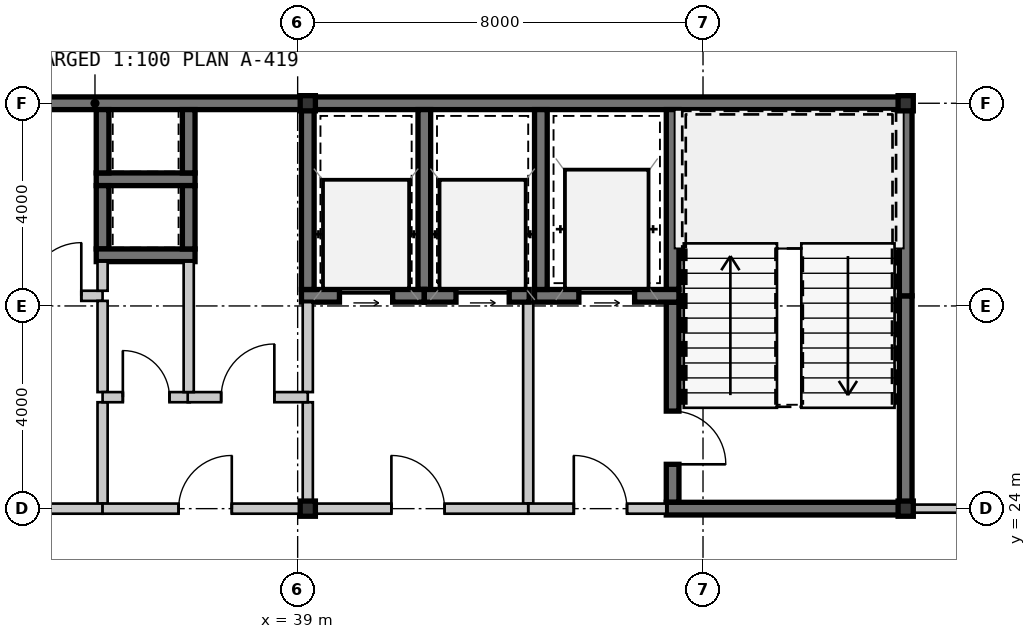
"""IFC4 building model, lengths in metres.
Left out: names, types, materials, properties, quantities, classifications, styles, units other than length and angle.
Written with IfcOpenShell. Run it as: python <this file> out.ifc"""

import sys

from ifc_helpers import new_model, si_unit, direction, frame, frame_2d, origin, origin_2d, place, context, subcontext, project, spatial, rectangle, hollow_rectangle, extrude, source, transform, mapped, element, fill, save


model = new_model("IFC4")
c1 = context("Model", 3, precision=1e-05, world=origin(), true_north=direction((0.0, 1.0)))
c2 = subcontext(c1, "Body", "Model", "MODEL_VIEW")
j1 = project(units=[si_unit("LENGTHUNIT", "METRE"), si_unit("PLANEANGLEUNIT", "RADIAN")], contexts=[c1])
p1 = place(None, origin())
s1 = spatial("IfcSite", under=j1, at=p1, CompositionType="ELEMENT")
p2 = place(p1, origin())
s2 = spatial("IfcBuilding", under=s1, at=p2, CompositionType="ELEMENT")
p3 = place(p2, frame((0.0, 0.0, 214.55)))
s3 = spatial("IfcBuildingStorey", under=s2, at=p3, CompositionType="ELEMENT", Elevation=214.55)
m1 = source(origin(), c2, "Body", "SweptSolid", [
    extrude(hollow_rectangle(XDim=0.3, YDim=0.3, WallThickness=0.012, at=origin_2d()), origin(), (0.0, 0.0, 1.0), 3.15),
])
for number, where, z_axis, x_axis in (
    (1, (39.2, 24.0, 0.0), (0.0, 0.0, 1.0), (1.0, 0.0, 0.0)),
    (2, (51.0, 24.0, 0.0), (0.0, 0.0, 1.0), (1.0, 0.0, 0.0)),
    (3, (39.2, 32.0, 0.0), (0.0, 0.0, 1.0), (1.0, 0.0, 0.0)),
    (4, (51.0, 32.0, 0.0), (0.0, 0.0, 1.0), (1.0, 0.0, 0.0)),
):
    element("IfcColumn", number, at=place(p3, frame(where, z_axis=z_axis, x_axis=x_axis)), inside=s3, PredefinedType="COLUMN", context=c2, shape_type="MappedRepresentation", body=[
        mapped(m1, transform((0.0, 0.0, 0.0), scale=1.0)),
    ])
m2 = source(origin(), c2, "Body", "SweptSolid", [
    extrude(rectangle(XDim=11.2, YDim=0.25, at=frame_2d((5.6, 0.0))), origin(), (0.0, 0.0, 1.0), 2.93),
])
p4 = place(p3, frame((28.0, 32.0, 0.0), z_axis=(0.0, 0.0, 1.0), x_axis=(1.0, 0.0, 0.0)))
e5 = element("IfcWall", 5, at=p4, inside=s3, PredefinedType="SHEAR", context=c2, shape_type="MappedRepresentation", body=[
    mapped(m2, transform((0.0, 0.0, 0.0), scale=1.0)),
])
m3 = source(origin(), c2, "Body", "SweptSolid", [
    extrude(rectangle(XDim=11.925, YDim=0.25, at=frame_2d((5.962, 0.0))), origin(), (0.0, 0.0, 1.0), 2.93),
])
p5 = place(p3, frame((39.2, 32.0, 0.0), z_axis=(0.0, 0.0, 1.0), x_axis=(1.0, 0.0, 0.0)))
e6 = element("IfcWall", 6, at=p5, inside=s3, PredefinedType="SHEAR", context=c2, shape_type="MappedRepresentation", body=[
    mapped(m3, transform((0.0, 0.0, 0.0), scale=1.0)),
])
m4 = source(origin(), c2, "Body", "SweptSolid", [
    extrude(rectangle(XDim=4.075, YDim=0.25, at=frame_2d((2.038, 0.0))), origin(), (0.0, 0.0, 1.0), 2.93),
])
p6 = place(p3, frame((51.0, 24.125, 0.0), z_axis=(0.0, 0.0, 1.0), x_axis=(0.0, 1.0, 0.0)))
e7 = element("IfcWall", 7, at=p6, inside=s3, PredefinedType="SHEAR", context=c2, shape_type="MappedRepresentation", body=[
    mapped(m4, transform((0.0, 0.0, 0.0), scale=1.0)),
])
m5 = source(origin(), c2, "Body", "SweptSolid", [
    extrude(rectangle(XDim=3.675, YDim=0.25, at=frame_2d((1.837, 0.0))), origin(), (0.0, 0.0, 1.0), 2.93),
])
p7 = place(p3, frame((51.0, 28.2, 0.0), z_axis=(0.0, 0.0, 1.0), x_axis=(0.0, 1.0, 0.0)))
e8 = element("IfcWall", 8, at=p7, inside=s3, PredefinedType="SHEAR", context=c2, shape_type="MappedRepresentation", body=[
    mapped(m5, transform((0.0, 0.0, 0.0), scale=1.0)),
])
m6 = source(origin(), c2, "Body", "SweptSolid", [
    extrude(rectangle(XDim=3.55, YDim=0.25, at=frame_2d((1.775, 0.0))), origin(), (0.0, 0.0, 1.0), 2.93),
])
p8 = place(p3, frame((46.4, 31.875, 0.0), z_axis=(0.0, 0.0, 1.0), x_axis=(0.0, -1.0, 0.0)))
e9 = element("IfcWall", 9, at=p8, inside=s3, PredefinedType="SHEAR", context=c2, shape_type="MappedRepresentation", body=[
    mapped(m6, transform((0.0, 0.0, 0.0), scale=1.0)),
])
m7 = source(origin(), c2, "Body", "SweptSolid", [
    extrude(rectangle(XDim=3.95, YDim=0.25, at=frame_2d((1.975, 0.0))), origin(), (0.0, 0.0, 1.0), 2.93),
])
p9 = place(p3, frame((46.4, 28.075, 0.0), z_axis=(0.0, 0.0, 1.0), x_axis=(0.0, -1.0, 0.0)))
e10 = element("IfcWall", 10, at=p9, inside=s3, PredefinedType="SHEAR", context=c2, shape_type="MappedRepresentation", body=[
    mapped(m7, transform((0.0, 0.0, 0.0), scale=1.0)),
])
m8 = source(origin(), c2, "Body", "SweptSolid", [
    extrude(rectangle(XDim=1.05, YDim=2.1, at=frame_2d((0.525, 1.05))), frame((0.0, 0.135, 0.0), z_axis=(0.0, -1.0, 0.0), x_axis=(1.0, 0.0, 0.0)), (0.0, 0.0, 1.0), 0.27),
])
p10 = place(p9, frame((2.15, 0.0, 0.0)))
e11 = element("IfcOpeningElement", 11, at=p10, cuts=e10, PredefinedType="OPENING", context=c2, shape_type="MappedRepresentation", body=[
    mapped(m8, transform((0.0, 0.0, 0.0), scale=1.0)),
])
m9 = source(origin(), c2, "Body", "SweptSolid", [
    extrude(rectangle(XDim=4.85, YDim=0.25, at=frame_2d((2.425, 0.0))), origin(), (0.0, 0.0, 1.0), 2.93),
])
p11 = place(p3, frame((46.275, 24.0, 0.0), z_axis=(0.0, 0.0, 1.0), x_axis=(1.0, 0.0, 0.0)))
e12 = element("IfcWall", 12, at=p11, inside=s3, PredefinedType="SHEAR", context=c2, shape_type="MappedRepresentation", body=[
    mapped(m9, transform((0.0, 0.0, 0.0), scale=1.0)),
])
m10 = source(origin(), c2, "Body", "SweptSolid", [
    extrude(rectangle(XDim=2.85, YDim=0.25, at=frame_2d((1.425, 0.0))), origin(), (0.0, 0.0, 1.0), 2.93),
])
p12 = place(p3, frame((43.675, 28.2, 0.0), z_axis=(0.0, 0.0, 1.0), x_axis=(1.0, 0.0, 0.0)))
e13 = element("IfcWall", 13, at=p12, inside=s3, PredefinedType="SHEAR", context=c2, shape_type="MappedRepresentation", body=[
    mapped(m10, transform((0.0, 0.0, 0.0), scale=1.0)),
])
m11 = source(origin(), c2, "Body", "SweptSolid", [
    extrude(rectangle(XDim=1.1, YDim=2.15, at=frame_2d((0.55, 1.075))), frame((0.0, 0.135, 0.0), z_axis=(0.0, -1.0, 0.0), x_axis=(1.0, 0.0, 0.0)), (0.0, 0.0, 1.0), 0.27),
])
p13 = place(p12, frame((0.875, 0.0, 0.0)))
e14 = element("IfcOpeningElement", 14, at=p13, cuts=e13, PredefinedType="OPENING", context=c2, shape_type="MappedRepresentation", body=[
    mapped(m11, transform((0.0, 0.0, 0.0), scale=1.0)),
])
p14 = place(p3, frame((43.8, 31.875, 0.0), z_axis=(0.0, 0.0, 1.0), x_axis=(0.0, -1.0, 0.0)))
e15 = element("IfcWall", 15, at=p14, inside=s3, PredefinedType="SHEAR", context=c2, shape_type="MappedRepresentation", body=[
    mapped(m6, transform((0.0, 0.0, 0.0), scale=1.0)),
])
m12 = source(origin(), c2, "Body", "SweptSolid", [
    extrude(rectangle(XDim=3.975, YDim=0.2, at=frame_2d((1.987, 0.0))), origin(), (0.0, 0.0, 1.0), 2.93),
])
p15 = place(p3, frame((43.55, 28.075, 0.0), z_axis=(0.0, 0.0, 1.0), x_axis=(0.0, -1.0, 0.0)))
e16 = element("IfcWall", 16, at=p15, inside=s3, PredefinedType="SOLIDWALL", context=c2, shape_type="MappedRepresentation", body=[
    mapped(m12, transform((0.0, 0.0, 0.0), scale=1.0)),
])
m13 = source(origin(), c2, "Body", "SweptSolid", [
    extrude(rectangle(XDim=2.725, YDim=0.2, at=frame_2d((1.362, 0.0))), origin(), (0.0, 0.0, 1.0), 2.397),
])
p16 = place(p3, frame((43.55, 24.0, 0.0), z_axis=(0.0, 0.0, 1.0), x_axis=(1.0, 0.0, 0.0)))
e17 = element("IfcWall", 17, at=p16, inside=s3, PredefinedType="SOLIDWALL", context=c2, shape_type="MappedRepresentation", body=[
    mapped(m13, transform((0.0, 0.0, 0.0), scale=1.0)),
])
m14 = source(origin(), c2, "Body", "SweptSolid", [
    extrude(rectangle(XDim=1.05, YDim=2.1, at=frame_2d((0.525, 1.05))), frame((0.0, 0.11, 0.0), z_axis=(0.0, -1.0, 0.0), x_axis=(1.0, 0.0, 0.0)), (0.0, 0.0, 1.0), 0.22),
])
p17 = place(p16, frame((0.9, 0.0, 0.0)))
e18 = element("IfcOpeningElement", 18, at=p17, cuts=e17, PredefinedType="OPENING", context=c2, shape_type="MappedRepresentation", body=[
    mapped(m14, transform((0.0, 0.0, 0.0), scale=1.0)),
])
m15 = source(origin(), c2, "Body", "SweptSolid", [
    extrude(rectangle(XDim=1.95, YDim=0.25, at=frame_2d((0.975, 0.0))), origin(), (0.0, 0.0, 1.0), 2.93),
])
p18 = place(p3, frame((35.025, 30.5, 0.0), z_axis=(0.0, 0.0, 1.0), x_axis=(1.0, 0.0, 0.0)))
e19 = element("IfcWall", 19, at=p18, inside=s3, PredefinedType="SHEAR", context=c2, shape_type="MappedRepresentation", body=[
    mapped(m15, transform((0.0, 0.0, 0.0), scale=1.0)),
])
m16 = source(origin(), c2, "Body", "SweptSolid", [
    extrude(rectangle(XDim=1.25, YDim=0.25, at=frame_2d((0.625, 0.0))), origin(), (0.0, 0.0, 1.0), 2.93),
])
for number, where, z_axis, x_axis in (
    (20, (35.15, 31.875, 0.0), (0.0, 0.0, 1.0), (0.0, -1.0, 0.0)),
    (21, (36.85, 30.625, 0.0), (0.0, 0.0, 1.0), (0.0, 1.0, 0.0)),
    (22, (35.15, 30.375, 0.0), (0.0, 0.0, 1.0), (0.0, -1.0, 0.0)),
):
    element("IfcWall", number, at=place(p3, frame(where, z_axis=z_axis, x_axis=x_axis)), inside=s3, PredefinedType="SHEAR", context=c2, shape_type="MappedRepresentation", body=[
        mapped(m16, transform((0.0, 0.0, 0.0), scale=1.0)),
    ])
p19 = place(p3, frame((35.025, 29.0, 0.0), z_axis=(0.0, 0.0, 1.0), x_axis=(1.0, 0.0, 0.0)))
e23 = element("IfcWall", 23, at=p19, inside=s3, PredefinedType="SHEAR", context=c2, shape_type="MappedRepresentation", body=[
    mapped(m15, transform((0.0, 0.0, 0.0), scale=1.0)),
])
p20 = place(p3, frame((36.85, 29.125, 0.0), z_axis=(0.0, 0.0, 1.0), x_axis=(0.0, 1.0, 0.0)))
e24 = element("IfcWall", 24, at=p20, inside=s3, PredefinedType="SHEAR", context=c2, shape_type="MappedRepresentation", body=[
    mapped(m16, transform((0.0, 0.0, 0.0), scale=1.0)),
])
p21 = place(p3, frame((41.5, 28.325, 0.0), z_axis=(0.0, 0.0, 1.0), x_axis=(0.0, 1.0, 0.0)))
e25 = element("IfcWall", 25, at=p21, inside=s3, PredefinedType="SHEAR", context=c2, shape_type="MappedRepresentation", body=[
    mapped(m6, transform((0.0, 0.0, 0.0), scale=1.0)),
])
m17 = source(origin(), c2, "Body", "SweptSolid", [
    extrude(rectangle(XDim=2.425, YDim=0.25, at=frame_2d((1.212, 0.0))), origin(), (0.0, 0.0, 1.0), 2.93),
])
p22 = place(p3, frame((39.075, 28.2, 0.0), z_axis=(0.0, 0.0, 1.0), x_axis=(1.0, 0.0, 0.0)))
e26 = element("IfcWall", 26, at=p22, inside=s3, PredefinedType="SHEAR", context=c2, shape_type="MappedRepresentation", body=[
    mapped(m17, transform((0.0, 0.0, 0.0), scale=1.0)),
])
m18 = source(origin(), c2, "Body", "SweptSolid", [
    extrude(rectangle(XDim=1.05, YDim=2.15, at=frame_2d((0.525, 1.075))), frame((0.0, 0.135, 0.0), z_axis=(0.0, -1.0, 0.0), x_axis=(1.0, 0.0, 0.0)), (0.0, 0.0, 1.0), 0.27),
])
p23 = place(p22, frame((0.75, 0.0, 0.0)))
e27 = element("IfcOpeningElement", 27, at=p23, cuts=e26, PredefinedType="OPENING", context=c2, shape_type="MappedRepresentation", body=[
    mapped(m18, transform((0.0, 0.0, 0.0), scale=1.0)),
])
p24 = place(p3, frame((39.2, 31.875, 0.0), z_axis=(0.0, 0.0, 1.0), x_axis=(0.0, -1.0, 0.0)))
e28 = element("IfcWall", 28, at=p24, inside=s3, PredefinedType="SHEAR", context=c2, shape_type="MappedRepresentation", body=[
    mapped(m6, transform((0.0, 0.0, 0.0), scale=1.0)),
])
m19 = source(origin(), c2, "Body", "SweptSolid", [
    extrude(rectangle(XDim=2.07, YDim=0.25, at=frame_2d((1.035, 0.0))), origin(), (0.0, 0.0, 1.0), 2.93),
])
p25 = place(p3, frame((41.5, 28.2, 0.0), z_axis=(0.0, 0.0, 1.0), x_axis=(1.0, 0.0, 0.0)))
e29 = element("IfcWall", 29, at=p25, inside=s3, PredefinedType="SHEAR", context=c2, shape_type="MappedRepresentation", body=[
    mapped(m19, transform((0.0, 0.0, 0.0), scale=1.0)),
])
p26 = place(p25, frame((0.625, 0.0, 0.0)))
e30 = element("IfcOpeningElement", 30, at=p26, cuts=e29, PredefinedType="OPENING", context=c2, shape_type="MappedRepresentation", body=[
    mapped(m18, transform((0.0, 0.0, 0.0), scale=1.0)),
])
m20 = source(origin(), c2, "Body", "SweptSolid", [
    extrude(rectangle(XDim=2.0, YDim=0.2, at=frame_2d((1.0, 0.0))), origin(), (0.0, 0.0, 1.0), 2.47),
])
p27 = place(p3, frame((39.2, 24.1, 0.0), z_axis=(0.0, 0.0, 1.0), x_axis=(0.0, 1.0, 0.0)))
e31 = element("IfcWall", 31, at=p27, inside=s3, PredefinedType="SOLIDWALL", context=c2, shape_type="MappedRepresentation", body=[
    mapped(m20, transform((0.0, 0.0, 0.0), scale=1.0)),
])
m21 = source(origin(), c2, "Body", "SweptSolid", [
    extrude(rectangle(XDim=1.775, YDim=0.2, at=frame_2d((0.887, 0.0))), origin(), (0.0, 0.0, 1.0), 2.47),
])
p28 = place(p3, frame((39.2, 26.3, 0.0), z_axis=(0.0, 0.0, 1.0), x_axis=(0.0, 1.0, 0.0)))
e32 = element("IfcWall", 32, at=p28, inside=s3, PredefinedType="SOLIDWALL", context=c2, shape_type="MappedRepresentation", body=[
    mapped(m21, transform((0.0, 0.0, 0.0), scale=1.0)),
])
m22 = source(origin(), c2, "Body", "SweptSolid", [
    extrude(rectangle(XDim=4.35, YDim=0.2, at=frame_2d((2.175, 0.0))), origin(), (0.0, 0.0, 1.0), 2.397),
])
p29 = place(p3, frame((43.55, 24.0, 0.0), z_axis=(0.0, 0.0, 1.0), x_axis=(-1.0, 0.0, 0.0)))
e33 = element("IfcWall", 33, at=p29, inside=s3, PredefinedType="SOLIDWALL", context=c2, shape_type="MappedRepresentation", body=[
    mapped(m22, transform((0.0, 0.0, 0.0), scale=1.0)),
])
p30 = place(p29, frame((1.65, 0.0, 0.0)))
e34 = element("IfcOpeningElement", 34, at=p30, cuts=e33, PredefinedType="OPENING", context=c2, shape_type="MappedRepresentation", body=[
    mapped(m14, transform((0.0, 0.0, 0.0), scale=1.0)),
])
m23 = source(origin(), c2, "Body", "SweptSolid", [
    extrude(rectangle(XDim=4.35, YDim=0.2, at=frame_2d((2.175, 0.0))), origin(), (0.0, 0.0, 1.0), 2.93),
])
p31 = place(p3, frame((30.8, 28.2, 0.0), z_axis=(0.0, 0.0, 1.0), x_axis=(1.0, 0.0, 0.0)))
e35 = element("IfcWall", 35, at=p31, inside=s3, PredefinedType="SOLIDWALL", context=c2, shape_type="MappedRepresentation", body=[
    mapped(m23, transform((0.0, 0.0, 0.0), scale=1.0)),
])
p32 = place(p31, frame((2.88, 0.0, 0.0)))
e36 = element("IfcOpeningElement", 36, at=p32, cuts=e35, PredefinedType="OPENING", context=c2, shape_type="MappedRepresentation", body=[
    mapped(m14, transform((0.0, 0.0, 0.0), scale=1.0)),
])
m24 = source(origin(), c2, "Body", "SweptSolid", [
    extrude(rectangle(XDim=2.0, YDim=0.2, at=frame_2d((1.0, 0.0))), origin(), (0.0, 0.0, 1.0), 2.93),
])
p33 = place(p3, frame((35.15, 26.1, 0.0), z_axis=(0.0, 0.0, 1.0), x_axis=(0.0, -1.0, 0.0)))
e37 = element("IfcWall", 37, at=p33, inside=s3, PredefinedType="SOLIDWALL", context=c2, shape_type="MappedRepresentation", body=[
    mapped(m24, transform((0.0, 0.0, 0.0), scale=1.0)),
])
m25 = source(origin(), c2, "Body", "SweptSolid", [
    extrude(rectangle(XDim=1.8, YDim=0.2, at=frame_2d((0.9, 0.0))), origin(), (0.0, 0.0, 1.0), 2.93),
])
p34 = place(p3, frame((35.15, 28.1, 0.0), z_axis=(0.0, 0.0, 1.0), x_axis=(0.0, -1.0, 0.0)))
e38 = element("IfcWall", 38, at=p34, inside=s3, PredefinedType="SOLIDWALL", context=c2, shape_type="MappedRepresentation", body=[
    mapped(m25, transform((0.0, 0.0, 0.0), scale=1.0)),
])
m26 = source(origin(), c2, "Body", "SweptSolid", [
    extrude(rectangle(XDim=4.35, YDim=0.2, at=frame_2d((2.175, 0.0))), origin(), (0.0, 0.0, 1.0), 2.47),
])
p35 = place(p3, frame((35.15, 24.0, 0.0), z_axis=(0.0, 0.0, 1.0), x_axis=(-1.0, 0.0, 0.0)))
e39 = element("IfcWall", 39, at=p35, inside=s3, PredefinedType="SOLIDWALL", context=c2, shape_type="MappedRepresentation", body=[
    mapped(m26, transform((0.0, 0.0, 0.0), scale=1.0)),
])
p36 = place(p35, frame((1.65, 0.0, 0.0)))
e40 = element("IfcOpeningElement", 40, at=p36, cuts=e39, PredefinedType="OPENING", context=c2, shape_type="MappedRepresentation", body=[
    mapped(m14, transform((0.0, 0.0, 0.0), scale=1.0)),
])
m27 = source(origin(), c2, "Body", "SweptSolid", [
    extrude(rectangle(XDim=0.575, YDim=0.2, at=frame_2d((0.288, 0.0))), origin(), (0.0, 0.0, 1.0), 2.93),
])
p37 = place(p3, frame((35.15, 28.875, 0.0), z_axis=(0.0, 0.0, 1.0), x_axis=(0.0, -1.0, 0.0)))
e41 = element("IfcWall", 41, at=p37, inside=s3, PredefinedType="SOLIDWALL", context=c2, shape_type="MappedRepresentation", body=[
    mapped(m27, transform((0.0, 0.0, 0.0), scale=1.0)),
])
m28 = source(origin(), c2, "Body", "SweptSolid", [
    extrude(rectangle(XDim=1.72, YDim=0.2, at=frame_2d((0.86, 0.0))), origin(), (0.0, 0.0, 1.0), 2.93),
])
p38 = place(p3, frame((35.15, 26.2, 0.0), z_axis=(0.0, 0.0, 1.0), x_axis=(1.0, 0.0, 0.0)))
e42 = element("IfcWall", 42, at=p38, inside=s3, PredefinedType="SOLIDWALL", context=c2, shape_type="MappedRepresentation", body=[
    mapped(m28, transform((0.0, 0.0, 0.0), scale=1.0)),
])
m29 = source(origin(), c2, "Body", "SweptSolid", [
    extrude(rectangle(XDim=0.92, YDim=2.1, at=frame_2d((0.46, 1.05))), frame((0.0, 0.11, 0.0), z_axis=(0.0, -1.0, 0.0), x_axis=(1.0, 0.0, 0.0)), (0.0, 0.0, 1.0), 0.22),
])
p39 = place(p38, frame((0.4, 0.0, 0.0)))
e43 = element("IfcOpeningElement", 43, at=p39, cuts=e42, PredefinedType="OPENING", context=c2, shape_type="MappedRepresentation", body=[
    mapped(m29, transform((0.0, 0.0, 0.0), scale=1.0)),
])
m30 = source(origin(), c2, "Body", "SweptSolid", [
    extrude(rectangle(XDim=2.37, YDim=0.2, at=frame_2d((1.185, 0.0))), origin(), (0.0, 0.0, 1.0), 2.93),
])
p40 = place(p3, frame((36.83, 26.2, 0.0), z_axis=(0.0, 0.0, 1.0), x_axis=(1.0, 0.0, 0.0)))
e44 = element("IfcWall", 44, at=p40, inside=s3, PredefinedType="SOLIDWALL", context=c2, shape_type="MappedRepresentation", body=[
    mapped(m30, transform((0.0, 0.0, 0.0), scale=1.0)),
])
p41 = place(p40, frame((0.66, 0.0, 0.0)))
e45 = element("IfcOpeningElement", 45, at=p41, cuts=e44, PredefinedType="OPENING", context=c2, shape_type="MappedRepresentation", body=[
    mapped(m14, transform((0.0, 0.0, 0.0), scale=1.0)),
])
m31 = source(origin(), c2, "Body", "SweptSolid", [
    extrude(rectangle(XDim=4.05, YDim=0.2, at=frame_2d((2.025, 0.0))), origin(), (0.0, 0.0, 1.0), 2.47),
])
p42 = place(p3, frame((39.2, 24.0, 0.0), z_axis=(0.0, 0.0, 1.0), x_axis=(-1.0, 0.0, 0.0)))
e46 = element("IfcWall", 46, at=p42, inside=s3, PredefinedType="SOLIDWALL", context=c2, shape_type="MappedRepresentation", body=[
    mapped(m31, transform((0.0, 0.0, 0.0), scale=1.0)),
])
p43 = place(p42, frame((1.5, 0.0, 0.0)))
e47 = element("IfcOpeningElement", 47, at=p43, cuts=e46, PredefinedType="OPENING", context=c2, shape_type="MappedRepresentation", body=[
    mapped(m14, transform((0.0, 0.0, 0.0), scale=1.0)),
])
m32 = source(origin(), c2, "Body", "SweptSolid", [
    extrude(rectangle(XDim=2.575, YDim=0.2, at=frame_2d((1.288, 0.0))), origin(), (0.0, 0.0, 1.0), 2.93),
])
p44 = place(p3, frame((36.85, 28.875, 0.0), z_axis=(0.0, 0.0, 1.0), x_axis=(0.0, -1.0, 0.0)))
e48 = element("IfcWall", 48, at=p44, inside=s3, PredefinedType="SOLIDWALL", context=c2, shape_type="MappedRepresentation", body=[
    mapped(m32, transform((0.0, 0.0, 0.0), scale=1.0)),
])
m33 = source(origin(), c2, "Body", "SweptSolid", [
    extrude(rectangle(XDim=6.378, YDim=0.16, at=frame_2d((3.189, 0.0))), origin(), (0.0, 0.0, 1.0), 2.93),
])
p45 = place(p3, frame((51.125, 24.0, 0.0), z_axis=(0.0, 0.0, 1.0), x_axis=(1.0, 0.0, 0.0)))
e49 = element("IfcWall", 49, at=p45, inside=s3, PredefinedType="PARTITIONING", context=c2, shape_type="MappedRepresentation", body=[
    mapped(m33, transform((0.0, 0.0, 0.0), scale=1.0)),
])
m34 = source(origin(), c2, "Body", "SweptSolid", [
    extrude(rectangle(XDim=0.92, YDim=2.1, at=frame_2d((0.46, 1.05))), frame((0.0, 0.09, 0.0), z_axis=(0.0, -1.0, 0.0), x_axis=(1.0, 0.0, 0.0)), (0.0, 0.0, 1.0), 0.18),
])
p46 = place(p45, frame((2.677, 0.0, 0.0)))
e50 = element("IfcOpeningElement", 50, at=p46, cuts=e49, PredefinedType="OPENING", context=c2, shape_type="MappedRepresentation", body=[
    mapped(m34, transform((0.0, 0.0, 0.0), scale=1.0)),
])
m35 = source(origin(), c2, "Body", "SweptSolid", [
    extrude(rectangle(XDim=1.05, YDim=2.1, at=frame_2d((0.525, 1.05))), frame((0.0, 0.025, 0.0), z_axis=(0.0, -1.0, 0.0), x_axis=(1.0, 0.0, 0.0)), (0.0, 0.0, 1.0), 0.05),
])
p47 = place(p10, origin())
e51 = element("IfcDoor", 51, at=p47, inside=s3, OperationType="SINGLE_SWING_RIGHT", PredefinedType="DOOR", context=c2, shape_type="MappedRepresentation", body=[
    mapped(m35, transform((0.0, 0.0, 0.0), scale=1.0)),
])
fill(e11, e51)
m36 = source(origin(), c2, "Body", "SweptSolid", [
    extrude(rectangle(XDim=1.1, YDim=2.15, at=frame_2d((0.55, 1.075))), frame((0.0, 0.025, 0.0), z_axis=(0.0, -1.0, 0.0), x_axis=(1.0, 0.0, 0.0)), (0.0, 0.0, 1.0), 0.05),
])
p48 = place(p13, origin())
e52 = element("IfcDoor", 52, at=p48, inside=s3, OperationType="SLIDING_TO_LEFT", PredefinedType="DOOR", context=c2, shape_type="MappedRepresentation", body=[
    mapped(m36, transform((0.0, 0.0, 0.0), scale=1.0)),
])
fill(e14, e52)
p49 = place(p17, origin())
e53 = element("IfcDoor", 53, at=p49, inside=s3, OperationType="SINGLE_SWING_LEFT", PredefinedType="DOOR", context=c2, shape_type="MappedRepresentation", body=[
    mapped(m35, transform((0.0, 0.0, 0.0), scale=1.0)),
])
fill(e18, e53)
m37 = source(origin(), c2, "Body", "SweptSolid", [
    extrude(rectangle(XDim=1.05, YDim=2.15, at=frame_2d((0.525, 1.075))), frame((0.0, 0.025, 0.0), z_axis=(0.0, -1.0, 0.0), x_axis=(1.0, 0.0, 0.0)), (0.0, 0.0, 1.0), 0.05),
])
p50 = place(p23, origin())
e54 = element("IfcDoor", 54, at=p50, inside=s3, OperationType="SLIDING_TO_LEFT", PredefinedType="DOOR", context=c2, shape_type="MappedRepresentation", body=[
    mapped(m37, transform((0.0, 0.0, 0.0), scale=1.0)),
])
fill(e27, e54)
p51 = place(p26, origin())
e55 = element("IfcDoor", 55, at=p51, inside=s3, OperationType="SLIDING_TO_LEFT", PredefinedType="DOOR", context=c2, shape_type="MappedRepresentation", body=[
    mapped(m37, transform((0.0, 0.0, 0.0), scale=1.0)),
])
fill(e30, e55)
p52 = place(p30, frame((1.05, 0.0, 0.0), z_axis=(0.0, 0.0, 1.0), x_axis=(-1.0, 0.0, 0.0)))
e56 = element("IfcDoor", 56, at=p52, inside=s3, OperationType="SINGLE_SWING_LEFT", PredefinedType="DOOR", context=c2, shape_type="MappedRepresentation", body=[
    mapped(m35, transform((0.0, 0.0, 0.0), scale=1.0)),
])
fill(e34, e56)
p53 = place(p32, origin())
e57 = element("IfcDoor", 57, at=p53, inside=s3, OperationType="SINGLE_SWING_RIGHT", PredefinedType="DOOR", context=c2, shape_type="MappedRepresentation", body=[
    mapped(m35, transform((0.0, 0.0, 0.0), scale=1.0)),
])
fill(e36, e57)
m38 = source(origin(), c2, "Body", "SweptSolid", [
    extrude(rectangle(XDim=0.92, YDim=2.1, at=frame_2d((0.46, 1.05))), frame((0.0, 0.025, 0.0), z_axis=(0.0, -1.0, 0.0), x_axis=(1.0, 0.0, 0.0)), (0.0, 0.0, 1.0), 0.05),
])
p54 = place(p39, origin())
e58 = element("IfcDoor", 58, at=p54, inside=s3, OperationType="SINGLE_SWING_LEFT", PredefinedType="DOOR", context=c2, shape_type="MappedRepresentation", body=[
    mapped(m38, transform((0.0, 0.0, 0.0), scale=1.0)),
])
fill(e43, e58)
p55 = place(p41, origin())
e59 = element("IfcDoor", 59, at=p55, inside=s3, OperationType="SINGLE_SWING_RIGHT", PredefinedType="DOOR", context=c2, shape_type="MappedRepresentation", body=[
    mapped(m35, transform((0.0, 0.0, 0.0), scale=1.0)),
])
fill(e45, e59)
p56 = place(p43, frame((1.05, 0.0, 0.0), z_axis=(0.0, 0.0, 1.0), x_axis=(-1.0, 0.0, 0.0)))
e60 = element("IfcDoor", 60, at=p56, inside=s3, OperationType="SINGLE_SWING_RIGHT", PredefinedType="DOOR", context=c2, shape_type="MappedRepresentation", body=[
    mapped(m35, transform((0.0, 0.0, 0.0), scale=1.0)),
])
fill(e47, e60)
save(model, sys.argv[1])
